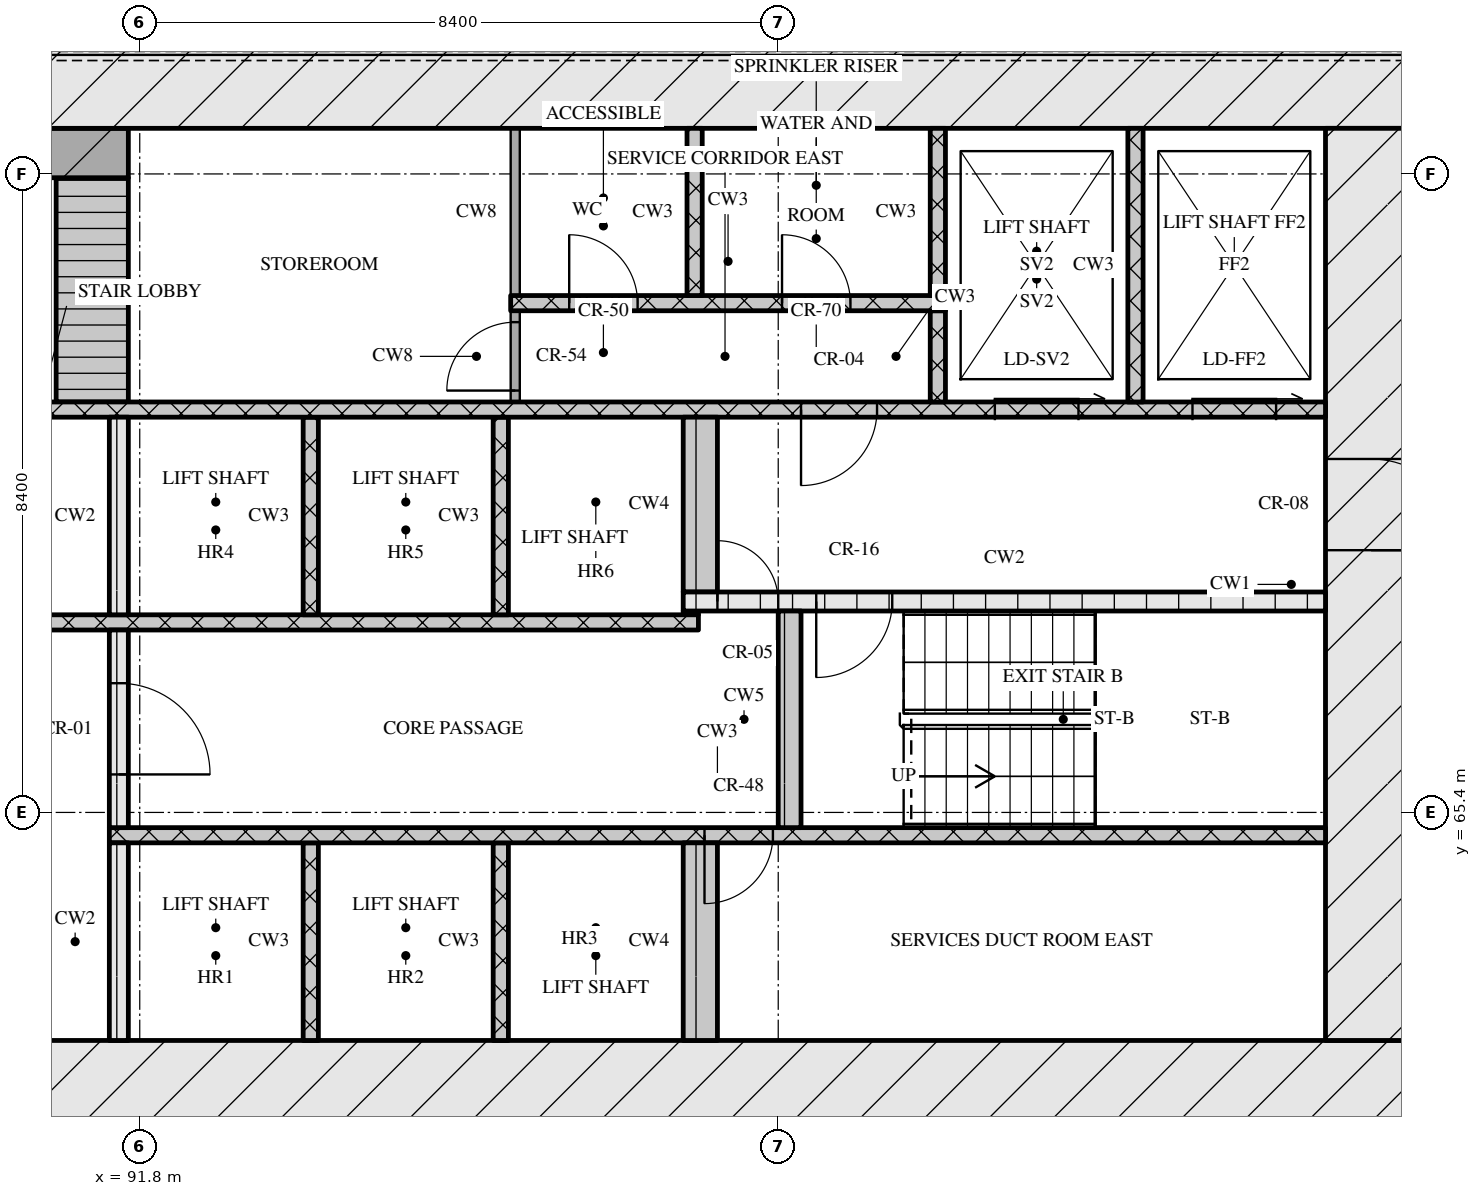
"""IFC4 building model, lengths in metres.
Left out: names, types, materials, properties, quantities, classifications, styles, units other than length and angle.
Written with IfcOpenShell. Run it as: python <this file> out.ifc"""

import sys

from ifc_helpers import new_model, si_unit, direction, frame, frame_2d, origin, place, context, subcontext, project, spatial, rectangle, extrude, element, fill, save


model = new_model("IFC4")
c1 = context("Model", 3, precision=1e-05, world=origin(), true_north=direction((0.0, 1.0)))
c2 = subcontext(c1, "Body", "Model", "MODEL_VIEW")
j1 = project(units=[si_unit("LENGTHUNIT", "METRE"), si_unit("PLANEANGLEUNIT", "RADIAN")], contexts=[c1])
p1 = place(None, origin())
s1 = spatial("IfcSite", under=j1, at=p1, CompositionType="ELEMENT")
p2 = place(p1, origin())
s2 = spatial("IfcBuilding", under=s1, at=p2, CompositionType="ELEMENT")
p3 = place(p2, frame((0.0, 0.0, 80.4)))
s3 = spatial("IfcBuildingStorey", under=s2, at=p3, CompositionType="ELEMENT", Elevation=80.4)
p4 = place(p3, frame((66.6, 61.8, 0.0), z_axis=(0.0, 0.0, 1.0), x_axis=(1.0, 0.0, 0.0)))
e1 = element("IfcWall", 1, at=p4, inside=s3, PredefinedType="SOLIDWALL", context=c2, shape_type="SweptSolid", body=[
    extrude(rectangle(XDim=42.0, YDim=1.2, at=frame_2d((21.0, 0.0))), origin(), (0.0, 0.0, 1.0), 3.3),
])
p5 = place(p4, frame((21.35, 0.0, 0.0)))
e2 = element("IfcOpeningElement", 2, at=p5, cuts=e1, PredefinedType="OPENING", context=c2, shape_type="SweptSolid", body=[
    extrude(rectangle(XDim=1.8, YDim=2.1, at=frame_2d((0.9, 1.05))), frame((0.0, 0.61, 0.0), z_axis=(0.0, -1.0, 0.0), x_axis=(1.0, 0.0, 0.0)), (0.0, 0.0, 1.0), 1.22),
])
p6 = place(p3, frame((66.6, 75.0, 0.0), z_axis=(0.0, 0.0, 1.0), x_axis=(1.0, 0.0, 0.0)))
e3 = element("IfcWall", 3, at=p6, inside=s3, PredefinedType="SOLIDWALL", context=c2, shape_type="SweptSolid", body=[
    extrude(rectangle(XDim=42.0, YDim=1.2, at=frame_2d((21.0, 0.0))), origin(), (0.0, 0.0, 1.0), 3.3),
])
p7 = place(p3, frame((108.0, 62.4, 0.0), z_axis=(0.0, 0.0, 1.0), x_axis=(0.0, 1.0, 0.0)))
e4 = element("IfcWall", 4, at=p7, inside=s3, PredefinedType="SOLIDWALL", context=c2, shape_type="SweptSolid", body=[
    extrude(rectangle(XDim=12.0, YDim=1.2, at=frame_2d((6.0, 0.0))), origin(), (0.0, 0.0, 1.0), 3.3),
])
p8 = place(p7, frame((6.45, 0.0, 0.0)))
e5 = element("IfcOpeningElement", 5, at=p8, cuts=e4, PredefinedType="OPENING", context=c2, shape_type="SweptSolid", body=[
    extrude(rectangle(XDim=1.2, YDim=2.1, at=frame_2d((0.6, 1.05))), frame((0.0, 0.61, 0.0), z_axis=(0.0, -1.0, 0.0), x_axis=(1.0, 0.0, 0.0)), (0.0, 0.0, 1.0), 1.22),
])
p9 = place(p3, frame((91.525, 62.4, 0.0), z_axis=(0.0, 0.0, 1.0), x_axis=(0.0, 1.0, 0.0)))
e6 = element("IfcWall", 6, at=p9, inside=s3, PredefinedType="SOLIDWALL", context=c2, shape_type="SweptSolid", body=[
    extrude(rectangle(XDim=2.6, YDim=0.25, at=frame_2d((1.3, 0.0))), origin(), (0.0, 0.0, 1.0), 3.3),
])
for number, where, z_axis, x_axis in (
    (7, (94.05, 62.4, 0.0), (0.0, 0.0, 1.0), (0.0, 1.0, 0.0)),
    (8, (96.55, 62.4, 0.0), (0.0, 0.0, 1.0), (0.0, 1.0, 0.0)),
):
    element("IfcWall", number, at=place(p3, frame(where, z_axis=z_axis, x_axis=x_axis)), inside=s3, PredefinedType="SOLIDWALL", context=c2, shape_type="SweptSolid", body=[
        extrude(rectangle(XDim=2.6, YDim=0.2, at=frame_2d((1.3, 0.0))), origin(), (0.0, 0.0, 1.0), 3.3),
    ])
p10 = place(p3, frame((99.175, 62.4, 0.0), z_axis=(0.0, 0.0, 1.0), x_axis=(0.0, 1.0, 0.0)))
e9 = element("IfcWall", 9, at=p10, inside=s3, PredefinedType="SOLIDWALL", context=c2, shape_type="SweptSolid", body=[
    extrude(rectangle(XDim=2.6, YDim=0.45, at=frame_2d((1.3, 0.0))), origin(), (0.0, 0.0, 1.0), 3.3),
])
p11 = place(p3, frame((91.4, 65.1, 0.0), z_axis=(0.0, 0.0, 1.0), x_axis=(1.0, 0.0, 0.0)))
e10 = element("IfcWall", 10, at=p11, inside=s3, PredefinedType="SOLIDWALL", context=c2, shape_type="SweptSolid", body=[
    extrude(rectangle(XDim=16.0, YDim=0.2, at=frame_2d((8.0, 0.0))), origin(), (0.0, 0.0, 1.0), 3.3),
])
p12 = place(p11, frame((7.83, 0.0, 0.0)))
e11 = element("IfcOpeningElement", 11, at=p12, cuts=e10, PredefinedType="OPENING", context=c2, shape_type="SweptSolid", body=[
    extrude(rectangle(XDim=0.9, YDim=2.1, at=frame_2d((0.45, 1.05))), frame((0.0, 0.11, 0.0), z_axis=(0.0, -1.0, 0.0), x_axis=(1.0, 0.0, 0.0)), (0.0, 0.0, 1.0), 0.22),
])
p13 = place(p3, frame((91.525, 65.2, 0.0), z_axis=(0.0, 0.0, 1.0), x_axis=(0.0, 1.0, 0.0)))
e12 = element("IfcWall", 12, at=p13, inside=s3, PredefinedType="SOLIDWALL", context=c2, shape_type="SweptSolid", body=[
    extrude(rectangle(XDim=2.6, YDim=0.25, at=frame_2d((1.3, 0.0))), origin(), (0.0, 0.0, 1.0), 3.3),
])
p14 = place(p13, frame((0.7, 0.0, 0.0)))
e13 = element("IfcOpeningElement", 13, at=p14, cuts=e12, PredefinedType="OPENING", context=c2, shape_type="SweptSolid", body=[
    extrude(rectangle(XDim=1.2, YDim=2.1, at=frame_2d((0.6, 1.05))), frame((0.0, 0.135, 0.0), z_axis=(0.0, -1.0, 0.0), x_axis=(1.0, 0.0, 0.0)), (0.0, 0.0, 1.0), 0.27),
])
p15 = place(p3, frame((100.35, 65.2, 0.0), z_axis=(0.0, 0.0, 1.0), x_axis=(0.0, 1.0, 0.0)))
e14 = element("IfcWall", 14, at=p15, inside=s3, PredefinedType="SOLIDWALL", context=c2, shape_type="SweptSolid", body=[
    extrude(rectangle(XDim=2.85, YDim=0.3, at=frame_2d((1.425, 0.0))), origin(), (0.0, 0.0, 1.0), 3.3),
])
p16 = place(p3, frame((76.05, 67.9, 0.0), z_axis=(0.0, 0.0, 1.0), x_axis=(1.0, 0.0, 0.0)))
e15 = element("IfcWall", 15, at=p16, inside=s3, PredefinedType="SOLIDWALL", context=c2, shape_type="SweptSolid", body=[
    extrude(rectangle(XDim=23.1, YDim=0.2, at=frame_2d((11.55, 0.0))), origin(), (0.0, 0.0, 1.0), 3.3),
])
p17 = place(p16, frame((0.6, 0.0, 0.0)))
e16 = element("IfcOpeningElement", 16, at=p17, cuts=e15, PredefinedType="OPENING", context=c2, shape_type="SweptSolid", body=[
    extrude(rectangle(XDim=1.1, YDim=2.1, at=frame_2d((0.55, 1.05))), frame((0.0, 0.11, 0.0), z_axis=(0.0, -1.0, 0.0), x_axis=(1.0, 0.0, 0.0)), (0.0, 0.0, 1.0), 0.22),
])
p18 = place(p16, frame((3.1, 0.0, 0.0)))
e17 = element("IfcOpeningElement", 17, at=p18, cuts=e15, PredefinedType="OPENING", context=c2, shape_type="SweptSolid", body=[
    extrude(rectangle(XDim=1.1, YDim=2.1, at=frame_2d((0.55, 1.05))), frame((0.0, 0.11, 0.0), z_axis=(0.0, -1.0, 0.0), x_axis=(1.0, 0.0, 0.0)), (0.0, 0.0, 1.0), 0.22),
])
p19 = place(p16, frame((5.6, 0.0, 0.0)))
e18 = element("IfcOpeningElement", 18, at=p19, cuts=e15, PredefinedType="OPENING", context=c2, shape_type="SweptSolid", body=[
    extrude(rectangle(XDim=1.1, YDim=2.1, at=frame_2d((0.55, 1.05))), frame((0.0, 0.11, 0.0), z_axis=(0.0, -1.0, 0.0), x_axis=(1.0, 0.0, 0.0)), (0.0, 0.0, 1.0), 0.22),
])
p20 = place(p16, frame((9.7, 0.0, 0.0)))
e19 = element("IfcOpeningElement", 19, at=p20, cuts=e15, PredefinedType="OPENING", context=c2, shape_type="SweptSolid", body=[
    extrude(rectangle(XDim=0.9, YDim=2.1, at=frame_2d((0.45, 1.05))), frame((0.0, 0.11, 0.0), z_axis=(0.0, -1.0, 0.0), x_axis=(1.0, 0.0, 0.0)), (0.0, 0.0, 1.0), 0.22),
])
p21 = place(p16, frame((13.55, 0.0, 0.0)))
e20 = element("IfcOpeningElement", 20, at=p21, cuts=e15, PredefinedType="OPENING", context=c2, shape_type="SweptSolid", body=[
    extrude(rectangle(XDim=1.0, YDim=2.1, at=frame_2d((0.5, 1.05))), frame((0.0, 0.11, 0.0), z_axis=(0.0, -1.0, 0.0), x_axis=(1.0, 0.0, 0.0)), (0.0, 0.0, 1.0), 0.22),
])
p22 = place(p3, frame((91.525, 68.0, 0.0), z_axis=(0.0, 0.0, 1.0), x_axis=(0.0, 1.0, 0.0)))
e21 = element("IfcWall", 21, at=p22, inside=s3, PredefinedType="SOLIDWALL", context=c2, shape_type="SweptSolid", body=[
    extrude(rectangle(XDim=2.6, YDim=0.25, at=frame_2d((1.3, 0.0))), origin(), (0.0, 0.0, 1.0), 3.3),
])
for number, where, z_axis, x_axis in (
    (22, (94.05, 68.0, 0.0), (0.0, 0.0, 1.0), (0.0, 1.0, 0.0)),
    (23, (96.55, 68.0, 0.0), (0.0, 0.0, 1.0), (0.0, 1.0, 0.0)),
):
    element("IfcWall", number, at=place(p3, frame(where, z_axis=z_axis, x_axis=x_axis)), inside=s3, PredefinedType="SOLIDWALL", context=c2, shape_type="SweptSolid", body=[
        extrude(rectangle(XDim=2.6, YDim=0.2, at=frame_2d((1.3, 0.0))), origin(), (0.0, 0.0, 1.0), 3.3),
    ])
p23 = place(p3, frame((98.95, 68.025, 0.0), z_axis=(0.0, 0.0, 1.0), x_axis=(1.0, 0.0, 0.0)))
e24 = element("IfcWall", 24, at=p23, inside=s3, PredefinedType="SOLIDWALL", context=c2, shape_type="SweptSolid", body=[
    extrude(rectangle(XDim=0.2, YDim=0.05, at=frame_2d((0.1, 0.0))), origin(), (0.0, 0.0, 1.0), 3.3),
])
p24 = place(p3, frame((98.95, 68.175, 0.0), z_axis=(0.0, 0.0, 1.0), x_axis=(1.0, 0.0, 0.0)))
e25 = element("IfcWall", 25, at=p24, inside=s3, PredefinedType="SOLIDWALL", context=c2, shape_type="SweptSolid", body=[
    extrude(rectangle(XDim=8.45, YDim=0.25, at=frame_2d((4.225, 0.0))), origin(), (0.0, 0.0, 1.0), 3.3),
])
p25 = place(p24, frame((0.45, 0.0, 0.0)))
e26 = element("IfcOpeningElement", 26, at=p25, cuts=e25, PredefinedType="OPENING", context=c2, shape_type="SweptSolid", body=[
    extrude(rectangle(XDim=0.8, YDim=2.1, at=frame_2d((0.4, 1.05))), frame((0.0, 0.135, 0.0), z_axis=(0.0, -1.0, 0.0), x_axis=(1.0, 0.0, 0.0)), (0.0, 0.0, 1.0), 0.27),
])
p26 = place(p24, frame((1.75, 0.0, 0.0)))
e27 = element("IfcOpeningElement", 27, at=p26, cuts=e25, PredefinedType="OPENING", context=c2, shape_type="SweptSolid", body=[
    extrude(rectangle(XDim=1.0, YDim=2.1, at=frame_2d((0.5, 1.05))), frame((0.0, 0.135, 0.0), z_axis=(0.0, -1.0, 0.0), x_axis=(1.0, 0.0, 0.0)), (0.0, 0.0, 1.0), 0.27),
])
p27 = place(p3, frame((99.175, 68.3, 0.0), z_axis=(0.0, 0.0, 1.0), x_axis=(0.0, 1.0, 0.0)))
e28 = element("IfcWall", 28, at=p27, inside=s3, PredefinedType="SOLIDWALL", context=c2, shape_type="SweptSolid", body=[
    extrude(rectangle(XDim=2.3, YDim=0.45, at=frame_2d((1.15, 0.0))), origin(), (0.0, 0.0, 1.0), 3.3),
])
p28 = place(p3, frame((67.8, 70.7, 0.0), z_axis=(0.0, 0.0, 1.0), x_axis=(1.0, 0.0, 0.0)))
e29 = element("IfcWall", 29, at=p28, inside=s3, PredefinedType="SOLIDWALL", context=c2, shape_type="SweptSolid", body=[
    extrude(rectangle(XDim=39.6, YDim=0.2, at=frame_2d((19.8, 0.0))), origin(), (0.0, 0.0, 1.0), 3.3),
])
p29 = place(p28, frame((0.65, 0.0, 0.0)))
e30 = element("IfcOpeningElement", 30, at=p29, cuts=e29, PredefinedType="OPENING", context=c2, shape_type="SweptSolid", body=[
    extrude(rectangle(XDim=1.1, YDim=2.1, at=frame_2d((0.55, 1.05))), frame((0.0, 0.11, 0.0), z_axis=(0.0, -1.0, 0.0), x_axis=(1.0, 0.0, 0.0)), (0.0, 0.0, 1.0), 0.22),
])
p30 = place(p28, frame((3.25, 0.0, 0.0)))
e31 = element("IfcOpeningElement", 31, at=p30, cuts=e29, PredefinedType="OPENING", context=c2, shape_type="SweptSolid", body=[
    extrude(rectangle(XDim=1.1, YDim=2.1, at=frame_2d((0.55, 1.05))), frame((0.0, 0.11, 0.0), z_axis=(0.0, -1.0, 0.0), x_axis=(1.0, 0.0, 0.0)), (0.0, 0.0, 1.0), 0.22),
])
p31 = place(p28, frame((5.9, 0.0, 0.0)))
e32 = element("IfcOpeningElement", 32, at=p31, cuts=e29, PredefinedType="OPENING", context=c2, shape_type="SweptSolid", body=[
    extrude(rectangle(XDim=1.0, YDim=2.1, at=frame_2d((0.5, 1.05))), frame((0.0, 0.11, 0.0), z_axis=(0.0, -1.0, 0.0), x_axis=(1.0, 0.0, 0.0)), (0.0, 0.0, 1.0), 0.22),
])
p32 = place(p28, frame((21.7, 0.0, 0.0)))
e33 = element("IfcOpeningElement", 33, at=p32, cuts=e29, PredefinedType="OPENING", context=c2, shape_type="SweptSolid", body=[
    extrude(rectangle(XDim=1.0, YDim=2.1, at=frame_2d((0.5, 1.05))), frame((0.0, 0.11, 0.0), z_axis=(0.0, -1.0, 0.0), x_axis=(1.0, 0.0, 0.0)), (0.0, 0.0, 1.0), 0.22),
])
p33 = place(p28, frame((32.7, 0.0, 0.0)))
e34 = element("IfcOpeningElement", 34, at=p33, cuts=e29, PredefinedType="OPENING", context=c2, shape_type="SweptSolid", body=[
    extrude(rectangle(XDim=1.0, YDim=2.1, at=frame_2d((0.5, 1.05))), frame((0.0, 0.11, 0.0), z_axis=(0.0, -1.0, 0.0), x_axis=(1.0, 0.0, 0.0)), (0.0, 0.0, 1.0), 0.22),
])
p34 = place(p28, frame((35.25, 0.0, 0.0)))
e35 = element("IfcOpeningElement", 35, at=p34, cuts=e29, PredefinedType="OPENING", context=c2, shape_type="SweptSolid", body=[
    extrude(rectangle(XDim=1.1, YDim=2.1, at=frame_2d((0.55, 1.05))), frame((0.0, 0.11, 0.0), z_axis=(0.0, -1.0, 0.0), x_axis=(1.0, 0.0, 0.0)), (0.0, 0.0, 1.0), 0.22),
])
p35 = place(p28, frame((37.85, 0.0, 0.0)))
e36 = element("IfcOpeningElement", 36, at=p35, cuts=e29, PredefinedType="OPENING", context=c2, shape_type="SweptSolid", body=[
    extrude(rectangle(XDim=1.1, YDim=2.1, at=frame_2d((0.55, 1.05))), frame((0.0, 0.11, 0.0), z_axis=(0.0, -1.0, 0.0), x_axis=(1.0, 0.0, 0.0)), (0.0, 0.0, 1.0), 0.22),
])
p36 = place(p3, frame((91.175, 70.8, 0.0), z_axis=(0.0, 0.0, 1.0), x_axis=(0.0, 1.0, 0.0)))
e37 = element("IfcWall", 37, at=p36, inside=s3, PredefinedType="SOLIDWALL", context=c2, shape_type="SweptSolid", body=[
    extrude(rectangle(XDim=2.95, YDim=0.95, at=frame_2d((1.475, 0.0))), origin(), (0.0, 0.0, 1.0), 3.3),
])
p37 = place(p3, frame((96.74, 70.8, 0.0), z_axis=(0.0, 0.0, 1.0), x_axis=(0.0, 1.0, 0.0)))
e38 = element("IfcWall", 38, at=p37, inside=s3, PredefinedType="PARTITIONING", context=c2, shape_type="SweptSolid", body=[
    extrude(rectangle(XDim=1.2, YDim=0.12, at=frame_2d((0.6, 0.0))), origin(), (0.0, 0.0, 1.0), 3.3),
])
p38 = place(p37, frame((0.15, 0.0, 0.0)))
e39 = element("IfcOpeningElement", 39, at=p38, cuts=e38, PredefinedType="OPENING", context=c2, shape_type="SweptSolid", body=[
    extrude(rectangle(XDim=0.9, YDim=2.1, at=frame_2d((0.45, 1.05))), frame((0.0, 0.07, 0.0), z_axis=(0.0, -1.0, 0.0), x_axis=(1.0, 0.0, 0.0)), (0.0, 0.0, 1.0), 0.14),
])
p39 = place(p3, frame((102.3, 70.8, 0.0), z_axis=(0.0, 0.0, 1.0), x_axis=(0.0, 1.0, 0.0)))
e40 = element("IfcWall", 40, at=p39, inside=s3, PredefinedType="SOLIDWALL", context=c2, shape_type="SweptSolid", body=[
    extrude(rectangle(XDim=1.2, YDim=0.2, at=frame_2d((0.6, 0.0))), origin(), (0.0, 0.0, 1.0), 3.3),
])
p40 = place(p3, frame((104.9, 70.8, 0.0), z_axis=(0.0, 0.0, 1.0), x_axis=(0.0, 1.0, 0.0)))
e41 = element("IfcWall", 41, at=p40, inside=s3, PredefinedType="SOLIDWALL", context=c2, shape_type="SweptSolid", body=[
    extrude(rectangle(XDim=3.6, YDim=0.2, at=frame_2d((1.8, 0.0))), origin(), (0.0, 0.0, 1.0), 3.3),
])
p41 = place(p3, frame((96.68, 72.1, 0.0), z_axis=(0.0, 0.0, 1.0), x_axis=(1.0, 0.0, 0.0)))
e42 = element("IfcWall", 42, at=p41, inside=s3, PredefinedType="SOLIDWALL", context=c2, shape_type="SweptSolid", body=[
    extrude(rectangle(XDim=5.72, YDim=0.2, at=frame_2d((2.86, 0.0))), origin(), (0.0, 0.0, 1.0), 3.3),
])
p42 = place(p41, frame((0.77, 0.0, 0.0)))
e43 = element("IfcOpeningElement", 43, at=p42, cuts=e42, PredefinedType="OPENING", context=c2, shape_type="SweptSolid", body=[
    extrude(rectangle(XDim=0.9, YDim=2.1, at=frame_2d((0.45, 1.05))), frame((0.0, 0.11, 0.0), z_axis=(0.0, -1.0, 0.0), x_axis=(1.0, 0.0, 0.0)), (0.0, 0.0, 1.0), 0.22),
])
p43 = place(p41, frame((3.57, 0.0, 0.0)))
e44 = element("IfcOpeningElement", 44, at=p43, cuts=e42, PredefinedType="OPENING", context=c2, shape_type="SweptSolid", body=[
    extrude(rectangle(XDim=0.9, YDim=2.1, at=frame_2d((0.45, 1.05))), frame((0.0, 0.11, 0.0), z_axis=(0.0, -1.0, 0.0), x_axis=(1.0, 0.0, 0.0)), (0.0, 0.0, 1.0), 0.22),
])
p44 = place(p3, frame((96.74, 72.2, 0.0), z_axis=(0.0, 0.0, 1.0), x_axis=(0.0, 1.0, 0.0)))
e45 = element("IfcWall", 45, at=p44, inside=s3, PredefinedType="PARTITIONING", context=c2, shape_type="SweptSolid", body=[
    extrude(rectangle(XDim=2.2, YDim=0.12, at=frame_2d((1.1, 0.0))), origin(), (0.0, 0.0, 1.0), 3.3),
])
for number, where, z_axis, x_axis in (
    (46, (99.1, 72.2, 0.0), (0.0, 0.0, 1.0), (0.0, 1.0, 0.0)),
    (47, (102.3, 72.2, 0.0), (0.0, 0.0, 1.0), (0.0, 1.0, 0.0)),
):
    element("IfcWall", number, at=place(p3, frame(where, z_axis=z_axis, x_axis=x_axis)), inside=s3, PredefinedType="SOLIDWALL", context=c2, shape_type="SweptSolid", body=[
        extrude(rectangle(XDim=2.2, YDim=0.2, at=frame_2d((1.1, 0.0))), origin(), (0.0, 0.0, 1.0), 3.3),
    ])
p45 = place(p3, frame((83.55, 74.075, 0.0), z_axis=(0.0, 0.0, 1.0), x_axis=(1.0, 0.0, 0.0)))
e48 = element("IfcWall", 48, at=p45, inside=s3, PredefinedType="SOLIDWALL", context=c2, shape_type="SweptSolid", body=[
    extrude(rectangle(XDim=8.1, YDim=0.65, at=frame_2d((4.05, 0.0))), origin(), (0.0, 0.0, 1.0), 3.3),
])
p46 = place(p12, origin())
e49 = element("IfcDoor", 49, at=p46, inside=s3, OperationType="SINGLE_SWING_RIGHT", PredefinedType="DOOR", context=c2, shape_type="SweptSolid", body=[
    extrude(rectangle(XDim=0.9, YDim=2.1, at=frame_2d((0.45, 1.05))), frame((0.0, 0.025, 0.0), z_axis=(0.0, -1.0, 0.0), x_axis=(1.0, 0.0, 0.0)), (0.0, 0.0, 1.0), 0.05),
])
fill(e11, e49)
p47 = place(p14, origin())
e50 = element("IfcDoor", 50, at=p47, inside=s3, OperationType="SINGLE_SWING_RIGHT", PredefinedType="DOOR", context=c2, shape_type="SweptSolid", body=[
    extrude(rectangle(XDim=1.2, YDim=2.1, at=frame_2d((0.6, 1.05))), frame((0.0, 0.025, 0.0), z_axis=(0.0, -1.0, 0.0), x_axis=(1.0, 0.0, 0.0)), (0.0, 0.0, 1.0), 0.05),
])
fill(e13, e50)
p48 = place(p25, origin())
e51 = element("IfcDoor", 51, at=p48, inside=s3, OperationType="SINGLE_SWING_LEFT", PredefinedType="DOOR", context=c2, shape_type="SweptSolid", body=[
    extrude(rectangle(XDim=0.8, YDim=2.1, at=frame_2d((0.4, 1.05))), frame((0.0, 0.025, 0.0), z_axis=(0.0, -1.0, 0.0), x_axis=(1.0, 0.0, 0.0)), (0.0, 0.0, 1.0), 0.05),
])
fill(e26, e51)
p49 = place(p26, origin())
e52 = element("IfcDoor", 52, at=p49, inside=s3, OperationType="SINGLE_SWING_RIGHT", PredefinedType="DOOR", context=c2, shape_type="SweptSolid", body=[
    extrude(rectangle(XDim=1.0, YDim=2.1, at=frame_2d((0.5, 1.05))), frame((0.0, 0.025, 0.0), z_axis=(0.0, -1.0, 0.0), x_axis=(1.0, 0.0, 0.0)), (0.0, 0.0, 1.0), 0.05),
])
fill(e27, e52)
p50 = place(p8, origin())
e53 = element("IfcDoor", 53, at=p50, inside=s3, OperationType="SINGLE_SWING_RIGHT", PredefinedType="DOOR", context=c2, shape_type="SweptSolid", body=[
    extrude(rectangle(XDim=1.2, YDim=2.1, at=frame_2d((0.6, 1.05))), frame((0.0, 0.025, 0.0), z_axis=(0.0, -1.0, 0.0), x_axis=(1.0, 0.0, 0.0)), (0.0, 0.0, 1.0), 0.05),
])
fill(e5, e53)
p51 = place(p33, origin())
e54 = element("IfcDoor", 54, at=p51, inside=s3, OperationType="SINGLE_SWING_RIGHT", PredefinedType="DOOR", context=c2, shape_type="SweptSolid", body=[
    extrude(rectangle(XDim=1.0, YDim=2.1, at=frame_2d((0.5, 1.05))), frame((0.0, 0.025, 0.0), z_axis=(0.0, -1.0, 0.0), x_axis=(1.0, 0.0, 0.0)), (0.0, 0.0, 1.0), 0.05),
])
fill(e34, e54)
p52 = place(p34, origin())
e55 = element("IfcDoor", 55, at=p52, inside=s3, OperationType="SLIDING_TO_RIGHT", PredefinedType="DOOR", context=c2, shape_type="SweptSolid", body=[
    extrude(rectangle(XDim=1.1, YDim=2.1, at=frame_2d((0.55, 1.05))), frame((0.0, 0.025, 0.0), z_axis=(0.0, -1.0, 0.0), x_axis=(1.0, 0.0, 0.0)), (0.0, 0.0, 1.0), 0.05),
])
fill(e35, e55)
p53 = place(p35, origin())
e56 = element("IfcDoor", 56, at=p53, inside=s3, OperationType="SLIDING_TO_RIGHT", PredefinedType="DOOR", context=c2, shape_type="SweptSolid", body=[
    extrude(rectangle(XDim=1.1, YDim=2.1, at=frame_2d((0.55, 1.05))), frame((0.0, 0.025, 0.0), z_axis=(0.0, -1.0, 0.0), x_axis=(1.0, 0.0, 0.0)), (0.0, 0.0, 1.0), 0.05),
])
fill(e36, e56)
p54 = place(p38, origin())
e57 = element("IfcDoor", 57, at=p54, inside=s3, OperationType="SINGLE_SWING_LEFT", PredefinedType="DOOR", context=c2, shape_type="SweptSolid", body=[
    extrude(rectangle(XDim=0.9, YDim=2.1, at=frame_2d((0.45, 1.05))), frame((0.0, 0.025, 0.0), z_axis=(0.0, -1.0, 0.0), x_axis=(1.0, 0.0, 0.0)), (0.0, 0.0, 1.0), 0.05),
])
fill(e39, e57)
p55 = place(p42, origin())
e58 = element("IfcDoor", 58, at=p55, inside=s3, OperationType="SINGLE_SWING_LEFT", PredefinedType="DOOR", context=c2, shape_type="SweptSolid", body=[
    extrude(rectangle(XDim=0.9, YDim=2.1, at=frame_2d((0.45, 1.05))), frame((0.0, 0.025, 0.0), z_axis=(0.0, -1.0, 0.0), x_axis=(1.0, 0.0, 0.0)), (0.0, 0.0, 1.0), 0.05),
])
fill(e43, e58)
p56 = place(p43, origin())
e59 = element("IfcDoor", 59, at=p56, inside=s3, OperationType="SINGLE_SWING_LEFT", PredefinedType="DOOR", context=c2, shape_type="SweptSolid", body=[
    extrude(rectangle(XDim=0.9, YDim=2.1, at=frame_2d((0.45, 1.05))), frame((0.0, 0.025, 0.0), z_axis=(0.0, -1.0, 0.0), x_axis=(1.0, 0.0, 0.0)), (0.0, 0.0, 1.0), 0.05),
])
fill(e44, e59)
save(model, sys.argv[1])
